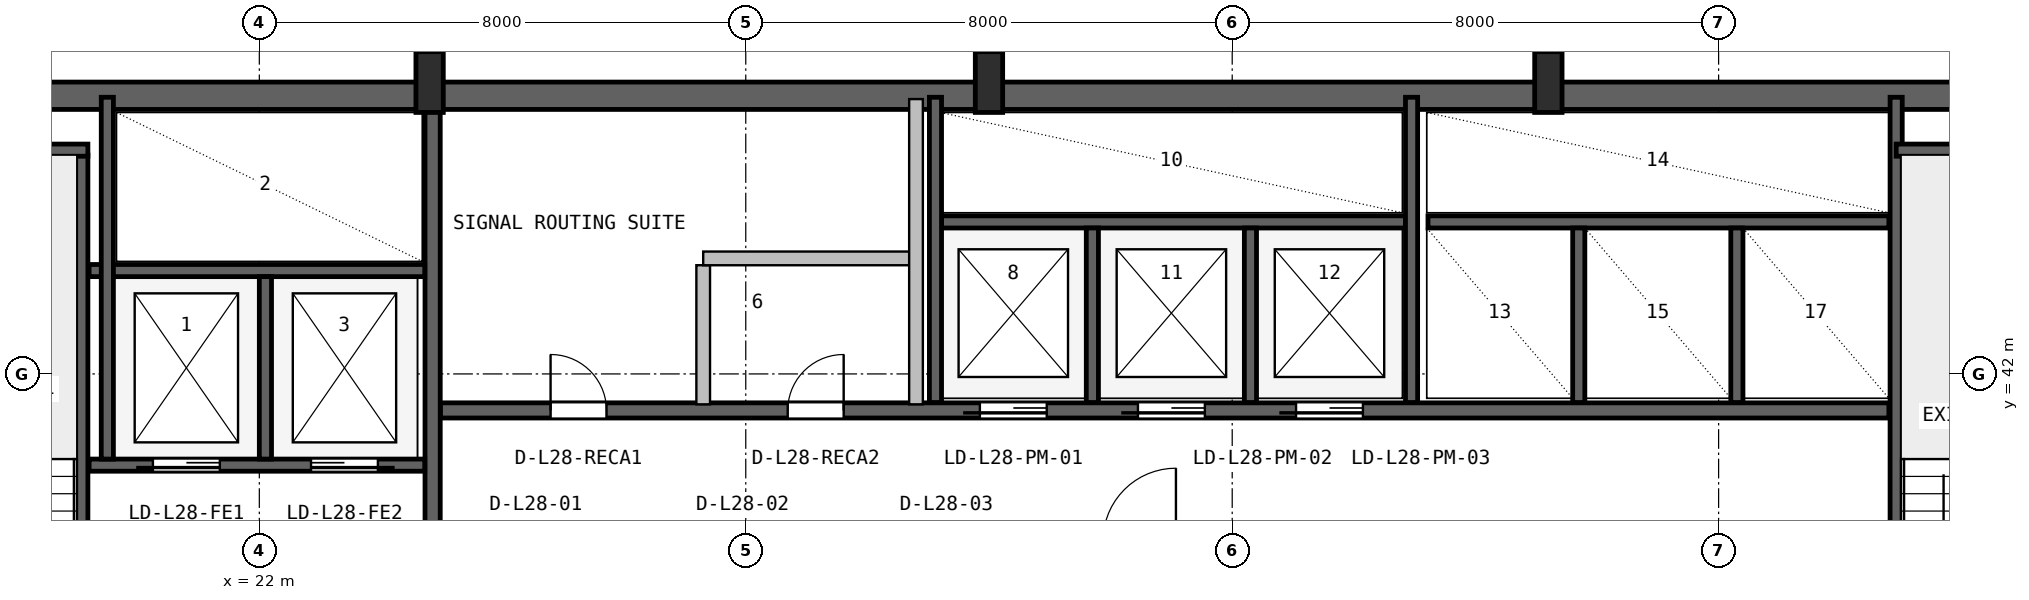
"""IFC4 building model, lengths in metres.
Left out: names, types, materials, properties, quantities, classifications, styles, units other than length and angle.
Written with IfcOpenShell. Run it as: python <this file> out.ifc"""

import sys

from ifc_helpers import new_model, si_unit, direction, frame, frame_2d, origin, origin_2d, place, context, subcontext, project, spatial, rectangle, i_section, extrude, source, transform, mapped, element, fill, save


model = new_model("IFC4")
c1 = context("Model", 3, precision=1e-05, world=origin(), true_north=direction((0.0, 1.0)))
c2 = subcontext(c1, "Body", "Model", "MODEL_VIEW")
j1 = project(units=[si_unit("LENGTHUNIT", "METRE"), si_unit("PLANEANGLEUNIT", "RADIAN")], contexts=[c1])
p1 = place(None, origin())
s1 = spatial("IfcSite", under=j1, at=p1, CompositionType="ELEMENT")
p2 = place(p1, origin())
s2 = spatial("IfcBuilding", under=s1, at=p2, CompositionType="ELEMENT")
p3 = place(p2, frame((0.0, 0.0, 118.2)))
s3 = spatial("IfcBuildingStorey", under=s2, at=p3, CompositionType="ELEMENT", Elevation=118.2)
p4 = place(p3, frame((15.6, 46.575, 0.0), z_axis=(0.0, 0.0, 1.0), x_axis=(1.0, 0.0, 0.0)))
e1 = element("IfcWall", 1, at=p4, inside=s3, PredefinedType="SHEAR", context=c2, shape_type="SweptSolid", body=[
    extrude(rectangle(XDim=36.8, YDim=0.45, at=frame_2d((18.4, 0.0))), origin(), (0.0, 0.0, 1.0), 3.55),
])
m1 = source(origin(), c2, "Body", "SweptSolid", [
    extrude(i_section(OverallWidth=0.45, OverallDepth=1.0, WebThickness=0.016, FlangeThickness=0.03, FilletRadius=0.016, at=origin_2d()), origin(), (0.0, 0.0, 1.0), 3.8),
])
for number, where, z_axis, x_axis in (
    (2, (24.8, 46.8, 0.0), (0.0, 0.0, 1.0), (1.0, 0.0, 0.0)),
    (3, (34.0, 46.8, 0.0), (0.0, 0.0, 1.0), (1.0, 0.0, 0.0)),
    (4, (43.2, 46.8, 0.0), (0.0, 0.0, 1.0), (1.0, 0.0, 0.0)),
):
    element("IfcColumn", number, at=place(p3, frame(where, z_axis=z_axis, x_axis=x_axis)), inside=s3, PredefinedType="COLUMN", context=c2, shape_type="MappedRepresentation", body=[
        mapped(m1, transform((0.0, 0.0, 0.0), x_axis=(1.0, 0.0, 0.0), y_axis=(0.0, 1.0, 0.0), z_axis=(0.0, 0.0, 1.0), scale=1.0)),
    ])
p5 = place(p3, frame((19.08, 35.95, 0.0), z_axis=(0.0, 0.0, 1.0), x_axis=(0.0, 1.0, 0.0)))
e5 = element("IfcWall", 5, at=p5, inside=s3, PredefinedType="SHEAR", context=c2, shape_type="SweptSolid", body=[
    extrude(rectangle(XDim=9.65, YDim=0.2, at=frame_2d((4.825, 0.0))), origin(), (0.0, 0.0, 1.0), 3.55),
])
p6 = place(p5, frame((0.25, 0.0, 0.0)))
e6 = element("IfcOpeningElement", 6, at=p6, cuts=e5, PredefinedType="OPENING", context=c2, shape_type="SweptSolid", body=[
    extrude(rectangle(XDim=0.95, YDim=2.1, at=frame_2d((0.475, 1.05))), frame((0.0, 0.11, 0.0), z_axis=(0.0, -1.0, 0.0), x_axis=(1.0, 0.0, 0.0)), (0.0, 0.0, 1.0), 0.22),
])
p7 = place(p3, frame((15.95, 45.68, 0.0), z_axis=(0.0, 0.0, 1.0), x_axis=(1.0, 0.0, 0.0)))
e7 = element("IfcWall", 7, at=p7, inside=s3, PredefinedType="SHEAR", context=c2, shape_type="SweptSolid", body=[
    extrude(rectangle(XDim=3.23, YDim=0.2, at=frame_2d((1.615, 0.0))), origin(), (0.0, 0.0, 1.0), 3.55),
])
p8 = place(p3, frame((24.85, 36.05, 0.0), z_axis=(0.0, 0.0, 1.0), x_axis=(0.0, 1.0, 0.0)))
e8 = element("IfcWall", 8, at=p8, inside=s3, PredefinedType="SHEAR", context=c2, shape_type="SweptSolid", body=[
    extrude(rectangle(XDim=10.45, YDim=0.25, at=frame_2d((5.225, 0.0))), origin(), (0.0, 0.0, 1.0), 3.55),
])
p9 = place(p3, frame((19.2, 40.5, 0.0), z_axis=(0.0, 0.0, 1.0), x_axis=(1.0, 0.0, 0.0)))
e9 = element("IfcWall", 9, at=p9, inside=s3, PredefinedType="SHEAR", context=c2, shape_type="SweptSolid", body=[
    extrude(rectangle(XDim=5.52, YDim=0.2, at=frame_2d((2.76, 0.0))), origin(), (0.0, 0.0, 1.0), 3.55),
])
p10 = place(p9, frame((1.05, 0.0, 0.0)))
e10 = element("IfcOpeningElement", 10, at=p10, cuts=e9, PredefinedType="OPENING", context=c2, shape_type="SweptSolid", body=[
    extrude(rectangle(XDim=1.1, YDim=2.18, at=frame_2d((0.55, 1.09))), frame((0.0, 0.11, 0.0), z_axis=(0.0, -1.0, 0.0), x_axis=(1.0, 0.0, 0.0)), (0.0, 0.0, 1.0), 0.22),
])
p11 = place(p9, frame((3.65, 0.0, 0.0)))
e11 = element("IfcOpeningElement", 11, at=p11, cuts=e9, PredefinedType="OPENING", context=c2, shape_type="SweptSolid", body=[
    extrude(rectangle(XDim=1.1, YDim=2.18, at=frame_2d((0.55, 1.09))), frame((0.0, 0.11, 0.0), z_axis=(0.0, -1.0, 0.0), x_axis=(1.0, 0.0, 0.0)), (0.0, 0.0, 1.0), 0.22),
])
p12 = place(p3, frame((19.2, 43.7, 0.0), z_axis=(0.0, 0.0, 1.0), x_axis=(1.0, 0.0, 0.0)))
e12 = element("IfcWall", 12, at=p12, inside=s3, PredefinedType="SHEAR", context=c2, shape_type="SweptSolid", body=[
    extrude(rectangle(XDim=5.52, YDim=0.2, at=frame_2d((2.76, 0.0))), origin(), (0.0, 0.0, 1.0), 3.55),
])
p13 = place(p3, frame((22.1, 40.6, 0.0), z_axis=(0.0, 0.0, 1.0), x_axis=(0.0, 1.0, 0.0)))
e13 = element("IfcWall", 13, at=p13, inside=s3, PredefinedType="SHEAR", context=c2, shape_type="SweptSolid", body=[
    extrude(rectangle(XDim=3.0, YDim=0.2, at=frame_2d((1.5, 0.0))), origin(), (0.0, 0.0, 1.0), 3.55),
])
p14 = place(p3, frame((19.5, 40.6, 0.0), z_axis=(0.0, 0.0, 1.0), x_axis=(0.0, 1.0, 0.0)))
e14 = element("IfcWall", 14, at=p14, inside=s3, PredefinedType="SHEAR", context=c2, shape_type="SweptSolid", body=[
    extrude(rectangle(XDim=5.95, YDim=0.2, at=frame_2d((2.975, 0.0))), origin(), (0.0, 0.0, 1.0), 3.55),
])
p15 = place(p3, frame((48.92, 36.05, 0.0), z_axis=(0.0, 0.0, 1.0), x_axis=(0.0, 1.0, 0.0)))
e15 = element("IfcWall", 15, at=p15, inside=s3, PredefinedType="SHEAR", context=c2, shape_type="SweptSolid", body=[
    extrude(rectangle(XDim=10.5, YDim=0.2, at=frame_2d((5.25, 0.0))), origin(), (0.0, 0.0, 1.0), 3.55),
])
p16 = place(p3, frame((48.92, 45.68, 0.0), z_axis=(0.0, 0.0, 1.0), x_axis=(1.0, 0.0, 0.0)))
e16 = element("IfcWall", 16, at=p16, inside=s3, PredefinedType="SHEAR", context=c2, shape_type="SweptSolid", body=[
    extrude(rectangle(XDim=3.18, YDim=0.2, at=frame_2d((1.59, 0.0))), origin(), (0.0, 0.0, 1.0), 3.55),
])
p17 = place(p3, frame((24.98, 41.4, 0.0), z_axis=(0.0, 0.0, 1.0), x_axis=(1.0, 0.0, 0.0)))
e17 = element("IfcWall", 17, at=p17, inside=s3, PredefinedType="SHEAR", context=c2, shape_type="SweptSolid", body=[
    extrude(rectangle(XDim=23.82, YDim=0.25, at=frame_2d((11.91, 0.0))), origin(), (0.0, 0.0, 1.0), 3.55),
])
p18 = place(p17, frame((8.87, 0.0, 0.0)))
e18 = element("IfcOpeningElement", 18, at=p18, cuts=e17, PredefinedType="OPENING", context=c2, shape_type="SweptSolid", body=[
    extrude(rectangle(XDim=1.1, YDim=2.18, at=frame_2d((0.55, 1.09))), frame((0.0, 0.135, 0.0), z_axis=(0.0, -1.0, 0.0), x_axis=(1.0, 0.0, 0.0)), (0.0, 0.0, 1.0), 0.27),
])
p19 = place(p17, frame((11.47, 0.0, 0.0)))
e19 = element("IfcOpeningElement", 19, at=p19, cuts=e17, PredefinedType="OPENING", context=c2, shape_type="SweptSolid", body=[
    extrude(rectangle(XDim=1.1, YDim=2.18, at=frame_2d((0.55, 1.09))), frame((0.0, 0.135, 0.0), z_axis=(0.0, -1.0, 0.0), x_axis=(1.0, 0.0, 0.0)), (0.0, 0.0, 1.0), 0.27),
])
p20 = place(p17, frame((14.07, 0.0, 0.0)))
e20 = element("IfcOpeningElement", 20, at=p20, cuts=e17, PredefinedType="OPENING", context=c2, shape_type="SweptSolid", body=[
    extrude(rectangle(XDim=1.1, YDim=2.18, at=frame_2d((0.55, 1.09))), frame((0.0, 0.135, 0.0), z_axis=(0.0, -1.0, 0.0), x_axis=(1.0, 0.0, 0.0)), (0.0, 0.0, 1.0), 0.27),
])
p21 = place(p17, frame((1.81, 0.0, 0.0)))
e21 = element("IfcOpeningElement", 21, at=p21, cuts=e17, PredefinedType="OPENING", context=c2, shape_type="SweptSolid", body=[
    extrude(rectangle(XDim=0.92, YDim=2.08, at=frame_2d((0.46, 1.04))), frame((0.0, 0.135, 0.0), z_axis=(0.0, -1.0, 0.0), x_axis=(1.0, 0.0, 0.0)), (0.0, 0.0, 1.0), 0.27),
])
p22 = place(p17, frame((5.71, 0.0, 0.0)))
e22 = element("IfcOpeningElement", 22, at=p22, cuts=e17, PredefinedType="OPENING", context=c2, shape_type="SweptSolid", body=[
    extrude(rectangle(XDim=0.92, YDim=2.08, at=frame_2d((0.46, 1.04))), frame((0.0, 0.135, 0.0), z_axis=(0.0, -1.0, 0.0), x_axis=(1.0, 0.0, 0.0)), (0.0, 0.0, 1.0), 0.27),
])
p23 = place(p3, frame((33.22, 44.5, 0.0), z_axis=(0.0, 0.0, 1.0), x_axis=(1.0, 0.0, 0.0)))
e23 = element("IfcWall", 23, at=p23, inside=s3, PredefinedType="SHEAR", context=c2, shape_type="SweptSolid", body=[
    extrude(rectangle(XDim=7.63, YDim=0.2, at=frame_2d((3.815, 0.0))), origin(), (0.0, 0.0, 1.0), 3.55),
])
p24 = place(p3, frame((33.12, 41.53, 0.0), z_axis=(0.0, 0.0, 1.0), x_axis=(0.0, 1.0, 0.0)))
e24 = element("IfcWall", 24, at=p24, inside=s3, PredefinedType="SHEAR", context=c2, shape_type="SweptSolid", body=[
    extrude(rectangle(XDim=5.02, YDim=0.2, at=frame_2d((2.51, 0.0))), origin(), (0.0, 0.0, 1.0), 3.55),
])
for number, where, z_axis, x_axis in (
    (25, (35.7, 41.53, 0.0), (0.0, 0.0, 1.0), (0.0, 1.0, 0.0)),
    (26, (38.3, 41.53, 0.0), (0.0, 0.0, 1.0), (0.0, 1.0, 0.0)),
):
    element("IfcWall", number, at=place(p3, frame(where, z_axis=z_axis, x_axis=x_axis)), inside=s3, PredefinedType="SHEAR", context=c2, shape_type="SweptSolid", body=[
        extrude(rectangle(XDim=2.87, YDim=0.2, at=frame_2d((1.435, 0.0))), origin(), (0.0, 0.0, 1.0), 3.55),
    ])
p25 = place(p3, frame((40.95, 41.53, 0.0), z_axis=(0.0, 0.0, 1.0), x_axis=(0.0, 1.0, 0.0)))
e27 = element("IfcWall", 27, at=p25, inside=s3, PredefinedType="SHEAR", context=c2, shape_type="SweptSolid", body=[
    extrude(rectangle(XDim=5.02, YDim=0.2, at=frame_2d((2.51, 0.0))), origin(), (0.0, 0.0, 1.0), 3.55),
])
p26 = place(p3, frame((41.22, 44.5, 0.0), z_axis=(0.0, 0.0, 1.0), x_axis=(1.0, 0.0, 0.0)))
e28 = element("IfcWall", 28, at=p26, inside=s3, PredefinedType="SHEAR", context=c2, shape_type="SweptSolid", body=[
    extrude(rectangle(XDim=7.58, YDim=0.2, at=frame_2d((3.79, 0.0))), origin(), (0.0, 0.0, 1.0), 3.55),
])
for number, where, z_axis, x_axis in (
    (29, (43.7, 41.53, 0.0), (0.0, 0.0, 1.0), (0.0, 1.0, 0.0)),
    (30, (46.3, 41.53, 0.0), (0.0, 0.0, 1.0), (0.0, 1.0, 0.0)),
):
    element("IfcWall", number, at=place(p3, frame(where, z_axis=z_axis, x_axis=x_axis)), inside=s3, PredefinedType="SHEAR", context=c2, shape_type="SweptSolid", body=[
        extrude(rectangle(XDim=2.87, YDim=0.2, at=frame_2d((1.435, 0.0))), origin(), (0.0, 0.0, 1.0), 3.55),
    ])
p27 = place(p3, frame((29.3, 41.5, 0.0), z_axis=(0.0, 0.0, 1.0), x_axis=(0.0, 1.0, 0.0)))
e31 = element("IfcWall", 31, at=p27, inside=s3, PredefinedType="PARTITIONING", context=c2, shape_type="SweptSolid", body=[
    extrude(rectangle(XDim=2.288, YDim=0.225, at=frame_2d((1.144, 0.0))), origin(), (0.0, 0.0, 1.0), 3.53),
])
p28 = place(p3, frame((29.3, 43.9, 0.0), z_axis=(0.0, 0.0, 1.0), x_axis=(1.0, 0.0, 0.0)))
e32 = element("IfcWall", 32, at=p28, inside=s3, PredefinedType="PARTITIONING", context=c2, shape_type="SweptSolid", body=[
    extrude(rectangle(XDim=3.5, YDim=0.225, at=frame_2d((1.75, 0.0))), origin(), (0.0, 0.0, 1.0), 3.53),
])
p29 = place(p3, frame((32.8, 41.5, 0.0), z_axis=(0.0, 0.0, 1.0), x_axis=(0.0, 1.0, 0.0)))
e33 = element("IfcWall", 33, at=p29, inside=s3, PredefinedType="PARTITIONING", context=c2, shape_type="SweptSolid", body=[
    extrude(rectangle(XDim=5.02, YDim=0.225, at=frame_2d((2.51, 0.0))), origin(), (0.0, 0.0, 1.0), 3.53),
])
m2 = source(origin(), c2, "Body", "SweptSolid", [
    extrude(rectangle(XDim=1.1, YDim=2.18, at=frame_2d((0.55, 1.09))), frame((0.0, 0.025, 0.0), z_axis=(0.0, -1.0, 0.0), x_axis=(1.0, 0.0, 0.0)), (0.0, 0.0, 1.0), 0.05),
])
p30 = place(p10, frame((1.1, 0.0, 0.0), z_axis=(0.0, 0.0, 1.0), x_axis=(-1.0, 0.0, 0.0)))
e34 = element("IfcDoor", 34, at=p30, inside=s3, OperationType="SLIDING_TO_LEFT", PredefinedType="DOOR", context=c2, shape_type="MappedRepresentation", body=[
    mapped(m2, transform((0.0, 0.0, 0.0), x_axis=(1.0, 0.0, 0.0), y_axis=(0.0, 1.0, 0.0), z_axis=(0.0, 0.0, 1.0), scale=1.0)),
])
fill(e10, e34)
p31 = place(p11, frame((1.1, 0.0, 0.0), z_axis=(0.0, 0.0, 1.0), x_axis=(-1.0, 0.0, 0.0)))
e35 = element("IfcDoor", 35, at=p31, inside=s3, OperationType="SLIDING_TO_RIGHT", PredefinedType="DOOR", context=c2, shape_type="MappedRepresentation", body=[
    mapped(m2, transform((0.0, 0.0, 0.0), x_axis=(1.0, 0.0, 0.0), y_axis=(0.0, 1.0, 0.0), z_axis=(0.0, 0.0, 1.0), scale=1.0)),
])
fill(e11, e35)
p32 = place(p18, frame((1.1, 0.0, 0.0), z_axis=(0.0, 0.0, 1.0), x_axis=(-1.0, 0.0, 0.0)))
e36 = element("IfcDoor", 36, at=p32, inside=s3, OperationType="SLIDING_TO_LEFT", PredefinedType="DOOR", context=c2, shape_type="MappedRepresentation", body=[
    mapped(m2, transform((0.0, 0.0, 0.0), x_axis=(1.0, 0.0, 0.0), y_axis=(0.0, 1.0, 0.0), z_axis=(0.0, 0.0, 1.0), scale=1.0)),
])
fill(e18, e36)
p33 = place(p19, frame((1.1, 0.0, 0.0), z_axis=(0.0, 0.0, 1.0), x_axis=(-1.0, 0.0, 0.0)))
e37 = element("IfcDoor", 37, at=p33, inside=s3, OperationType="SLIDING_TO_LEFT", PredefinedType="DOOR", context=c2, shape_type="MappedRepresentation", body=[
    mapped(m2, transform((0.0, 0.0, 0.0), x_axis=(1.0, 0.0, 0.0), y_axis=(0.0, 1.0, 0.0), z_axis=(0.0, 0.0, 1.0), scale=1.0)),
])
fill(e19, e37)
p34 = place(p20, frame((1.1, 0.0, 0.0), z_axis=(0.0, 0.0, 1.0), x_axis=(-1.0, 0.0, 0.0)))
e38 = element("IfcDoor", 38, at=p34, inside=s3, OperationType="SLIDING_TO_LEFT", PredefinedType="DOOR", context=c2, shape_type="MappedRepresentation", body=[
    mapped(m2, transform((0.0, 0.0, 0.0), x_axis=(1.0, 0.0, 0.0), y_axis=(0.0, 1.0, 0.0), z_axis=(0.0, 0.0, 1.0), scale=1.0)),
])
fill(e20, e38)
m3 = source(origin(), c2, "Body", "SweptSolid", [
    extrude(rectangle(XDim=0.92, YDim=2.08, at=frame_2d((0.46, 1.04))), frame((0.0, 0.025, 0.0), z_axis=(0.0, -1.0, 0.0), x_axis=(1.0, 0.0, 0.0)), (0.0, 0.0, 1.0), 0.05),
])
p35 = place(p21, origin())
e39 = element("IfcDoor", 39, at=p35, inside=s3, OperationType="SINGLE_SWING_LEFT", PredefinedType="DOOR", context=c2, shape_type="MappedRepresentation", body=[
    mapped(m3, transform((0.0, 0.0, 0.0), x_axis=(1.0, 0.0, 0.0), y_axis=(0.0, 1.0, 0.0), z_axis=(0.0, 0.0, 1.0), scale=1.0)),
])
fill(e21, e39)
p36 = place(p22, origin())
e40 = element("IfcDoor", 40, at=p36, inside=s3, OperationType="SINGLE_SWING_RIGHT", PredefinedType="DOOR", context=c2, shape_type="MappedRepresentation", body=[
    mapped(m3, transform((0.0, 0.0, 0.0), x_axis=(1.0, 0.0, 0.0), y_axis=(0.0, 1.0, 0.0), z_axis=(0.0, 0.0, 1.0), scale=1.0)),
])
fill(e22, e40)
save(model, sys.argv[1])
